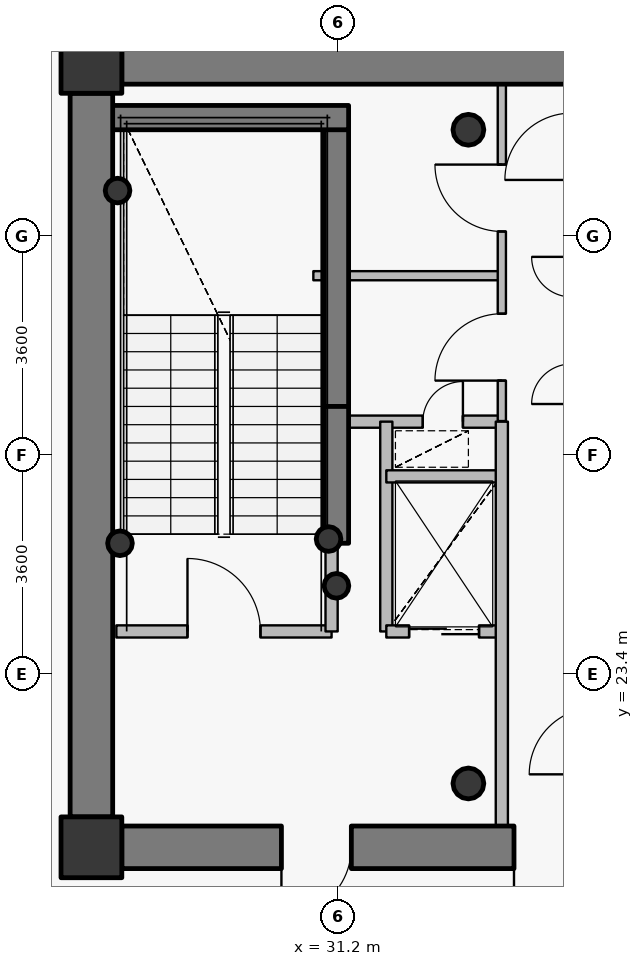
"""IFC4 building model, lengths in metres.
Left out: names, types, materials, properties, quantities, classifications, styles, units other than length and angle.
Written with IfcOpenShell. Run it as: python <this file> out.ifc"""

import sys

from ifc_helpers import new_model, si_unit, direction, frame, frame_2d, origin, origin_2d, place, context, subcontext, project, spatial, rectangle, hollow_circle, extrude, source, transform, mapped, element, fill, save


model = new_model("IFC4")
c1 = context("Model", 3, precision=1e-05, world=origin(), true_north=direction((0.0, 1.0)))
c2 = subcontext(c1, "Body", "Model", "MODEL_VIEW")
j1 = project(units=[si_unit("LENGTHUNIT", "METRE"), si_unit("PLANEANGLEUNIT", "RADIAN")], contexts=[c1])
p1 = place(None, origin())
s1 = spatial("IfcSite", under=j1, at=p1, CompositionType="ELEMENT")
p2 = place(p1, origin())
s2 = spatial("IfcBuilding", under=s1, at=p2, CompositionType="ELEMENT")
p3 = place(p2, frame((0.0, 0.0, 288.0)))
s3 = spatial("IfcBuildingStorey", under=s2, at=p3, CompositionType="ELEMENT", Elevation=288.0)
for number, where, z_axis, x_axis in (
    (1, (27.15, 20.55, 0.0), (0.0, 0.0, 1.0), (1.0, 0.0, 0.0)),
    (2, (27.15, 33.45, 0.0), (0.0, 0.0, 1.0), (1.0, 0.0, 0.0)),
):
    element("IfcColumn", number, at=place(p3, frame(where, z_axis=z_axis, x_axis=x_axis)), inside=s3, PredefinedType="COLUMN", context=c2, shape_type="SweptSolid", body=[
        extrude(rectangle(XDim=1.0, YDim=1.0, at=origin_2d()), origin(), (0.0, 0.0, 1.0), 3.75),
    ])
for number, where, z_axis, x_axis in (
    (3, (33.35, 21.6, 0.0), (0.0, 0.0, 1.0), (1.0, 0.0, 0.0)),
    (4, (33.35, 32.35, 0.0), (0.0, 0.0, 1.0), (1.0, 0.0, 0.0)),
):
    element("IfcColumn", number, at=place(p3, frame(where, z_axis=z_axis, x_axis=x_axis)), inside=s3, PredefinedType="COLUMN", context=c2, shape_type="SweptSolid", body=[
        extrude(hollow_circle(Radius=0.254, WallThickness=0.02, at=origin_2d()), origin(), (0.0, 0.0, 1.0), 3.75),
    ])
p4 = place(p3, frame((31.18, 27.8, 0.0), z_axis=(0.0, 0.0, 1.0), x_axis=(0.0, 1.0, 0.0)))
e5 = element("IfcWall", 5, at=p4, inside=s3, PredefinedType="SHEAR", context=c2, shape_type="SweptSolid", body=[
    extrude(rectangle(XDim=4.75, YDim=0.4, at=frame_2d((2.375, 0.0))), origin(), (0.0, 0.0, 1.0), 3.75),
])
p5 = place(p3, frame((27.25, 32.55, 0.0), z_axis=(0.0, 0.0, 1.0), x_axis=(1.0, 0.0, 0.0)))
e6 = element("IfcWall", 6, at=p5, inside=s3, PredefinedType="SHEAR", context=c2, shape_type="SweptSolid", body=[
    extrude(rectangle(XDim=4.13, YDim=0.4, at=frame_2d((2.065, 0.0))), origin(), (0.0, 0.0, 1.0), 3.75),
])
for number, where, z_axis, x_axis in (
    (7, (27.58, 31.35, 0.0), (0.0, 0.0, 1.0), (1.0, 0.0, 0.0)),
    (8, (31.05, 25.62, 0.0), (0.0, 0.0, 1.0), (1.0, 0.0, 0.0)),
    (9, (31.18, 24.85, 0.0), (0.0, 0.0, 1.0), (1.0, 0.0, 0.0)),
    (10, (27.62, 25.55, 0.0), (0.0, 0.0, 1.0), (1.0, 0.0, 0.0)),
):
    element("IfcColumn", number, at=place(p3, frame(where, z_axis=z_axis, x_axis=x_axis)), inside=s3, PredefinedType="COLUMN", context=c2, shape_type="SweptSolid", body=[
        extrude(hollow_circle(Radius=0.203, WallThickness=0.016, at=origin_2d()), origin(), (0.0, 0.0, 1.0), 3.75),
    ])
p6 = place(p3, frame((27.65, 33.45, 0.0), z_axis=(0.0, 0.0, 1.0), x_axis=(1.0, 0.0, 0.0)))
e11 = element("IfcWall", 11, at=p6, inside=s3, PredefinedType="SHEAR", context=c2, shape_type="SweptSolid", body=[
    extrude(rectangle(XDim=16.7, YDim=0.7, at=frame_2d((8.35, 0.0))), origin(), (0.0, 0.0, 1.0), 3.05),
])
p7 = place(p6, frame((12.775, 0.0, 0.0)))
e12 = element("IfcOpeningElement", 12, at=p7, cuts=e11, PredefinedType="OPENING", context=c2, shape_type="SweptSolid", body=[
    extrude(rectangle(XDim=1.15, YDim=2.15, at=origin_2d()), frame((0.575, 0.36, 1.075), z_axis=(0.0, -1.0, 0.0), x_axis=(1.0, 0.0, 0.0)), (0.0, 0.0, 1.0), 0.72),
])
p8 = place(p3, frame((44.35, 20.55, 0.0), z_axis=(0.0, 0.0, 1.0), x_axis=(-1.0, 0.0, 0.0)))
e13 = element("IfcWall", 13, at=p8, inside=s3, PredefinedType="SHEAR", context=c2, shape_type="SweptSolid", body=[
    extrude(rectangle(XDim=16.7, YDim=0.7, at=frame_2d((8.35, 0.0))), origin(), (0.0, 0.0, 1.0), 3.05),
])
p9 = place(p8, frame((12.925, 0.0, 0.0)))
e14 = element("IfcOpeningElement", 14, at=p9, cuts=e13, PredefinedType="OPENING", context=c2, shape_type="SweptSolid", body=[
    extrude(rectangle(XDim=1.15, YDim=2.15, at=origin_2d()), frame((0.575, 0.36, 1.075), z_axis=(0.0, -1.0, 0.0), x_axis=(1.0, 0.0, 0.0)), (0.0, 0.0, 1.0), 0.72),
])
p10 = place(p8, frame((9.1, 0.0, 0.0)))
e15 = element("IfcOpeningElement", 15, at=p10, cuts=e13, PredefinedType="OPENING", context=c2, shape_type="SweptSolid", body=[
    extrude(rectangle(XDim=1.15, YDim=2.15, at=origin_2d()), frame((0.575, 0.36, 1.075), z_axis=(0.0, -1.0, 0.0), x_axis=(1.0, 0.0, 0.0)), (0.0, 0.0, 1.0), 0.72),
])
p11 = place(p3, frame((27.15, 21.05, 0.0), z_axis=(0.0, 0.0, 1.0), x_axis=(0.0, 1.0, 0.0)))
e16 = element("IfcWall", 16, at=p11, inside=s3, PredefinedType="SHEAR", context=c2, shape_type="SweptSolid", body=[
    extrude(rectangle(XDim=11.9, YDim=0.7, at=frame_2d((5.95, 0.0))), origin(), (0.0, 0.0, 1.0), 3.05),
])
p12 = place(p3, frame((31.18, 25.55, 0.0), z_axis=(0.0, 0.0, 1.0), x_axis=(0.0, 1.0, 0.0)))
e17 = element("IfcWall", 17, at=p12, inside=s3, PredefinedType="SHEAR", context=c2, shape_type="SweptSolid", body=[
    extrude(rectangle(XDim=2.25, YDim=0.4, at=frame_2d((1.125, 0.0))), origin(), (0.0, 0.0, 1.0), 3.1),
])
p13 = place(p3, frame((27.56, 24.1, 0.0), z_axis=(0.0, 0.0, 1.0), x_axis=(1.0, 0.0, 0.0)))
e18 = element("IfcWall", 18, at=p13, inside=s3, PredefinedType="PARTITIONING", context=c2, shape_type="SweptSolid", body=[
    extrude(rectangle(XDim=3.54, YDim=0.2, at=frame_2d((1.77, 0.0))), origin(), (0.0, 0.0, 1.0), 3.5),
])
p14 = place(p13, frame((1.17, 0.0, 0.0)))
e19 = element("IfcOpeningElement", 19, at=p14, cuts=e18, PredefinedType="OPENING", context=c2, shape_type="SweptSolid", body=[
    extrude(rectangle(XDim=1.2, YDim=2.15, at=origin_2d()), frame((0.6, 0.11, 1.075), z_axis=(0.0, -1.0, 0.0), x_axis=(1.0, 0.0, 0.0)), (0.0, 0.0, 1.0), 0.22),
])
p15 = place(p3, frame((30.8, 29.95, 0.0), z_axis=(0.0, 0.0, 1.0), x_axis=(1.0, 0.0, 0.0)))
e20 = element("IfcWall", 20, at=p15, inside=s3, PredefinedType="PARTITIONING", context=c2, shape_type="SweptSolid", body=[
    extrude(rectangle(XDim=3.1, YDim=0.15, at=frame_2d((1.55, 0.0))), origin(), (0.0, 0.0, 1.0), 3.085),
])
p16 = place(p3, frame((31.1, 24.1, 0.0), z_axis=(0.0, 0.0, 1.0), x_axis=(0.0, 1.0, 0.0)))
e21 = element("IfcWall", 21, at=p16, inside=s3, PredefinedType="PARTITIONING", context=c2, shape_type="SweptSolid", body=[
    extrude(rectangle(XDim=1.44, YDim=0.2, at=frame_2d((0.72, 0.0))), origin(), (0.0, 0.0, 1.0), 3.5),
])
p17 = place(p3, frame((31.1, 27.55, 0.0), z_axis=(0.0, 0.0, 1.0), x_axis=(1.0, 0.0, 0.0)))
e22 = element("IfcWall", 22, at=p17, inside=s3, PredefinedType="PARTITIONING", context=c2, shape_type="SweptSolid", body=[
    extrude(rectangle(XDim=2.8, YDim=0.2, at=frame_2d((1.4, 0.0))), origin(), (0.0, 0.0, 1.0), 3.085),
])
p18 = place(p17, frame((1.5, 0.0, 0.0)))
e23 = element("IfcOpeningElement", 23, at=p18, cuts=e22, PredefinedType="OPENING", context=c2, shape_type="SweptSolid", body=[
    extrude(rectangle(XDim=0.66, YDim=2.05, at=origin_2d()), frame((0.33, 0.11, 1.025), z_axis=(0.0, -1.0, 0.0), x_axis=(1.0, 0.0, 0.0)), (0.0, 0.0, 1.0), 0.22),
])
p19 = place(p3, frame((32.0, 24.1, 0.0), z_axis=(0.0, 0.0, 1.0), x_axis=(0.0, 1.0, 0.0)))
e24 = element("IfcWall", 24, at=p19, inside=s3, PredefinedType="PARTITIONING", context=c2, shape_type="SweptSolid", body=[
    extrude(rectangle(XDim=3.45, YDim=0.2, at=frame_2d((1.725, 0.0))), origin(), (0.0, 0.0, 1.0), 3.5),
])
p20 = place(p3, frame((32.0, 24.1, 0.0), z_axis=(0.0, 0.0, 1.0), x_axis=(1.0, 0.0, 0.0)))
e25 = element("IfcWall", 25, at=p20, inside=s3, PredefinedType="PARTITIONING", context=c2, shape_type="SweptSolid", body=[
    extrude(rectangle(XDim=1.9, YDim=0.2, at=frame_2d((0.95, 0.0))), origin(), (0.0, 0.0, 1.0), 3.085),
])
p21 = place(p20, frame((0.375, 0.0, 0.0)))
e26 = element("IfcOpeningElement", 26, at=p21, cuts=e25, PredefinedType="OPENING", context=c2, shape_type="SweptSolid", body=[
    extrude(rectangle(XDim=1.15, YDim=2.15, at=origin_2d()), frame((0.575, 0.11, 1.075), z_axis=(0.0, -1.0, 0.0), x_axis=(1.0, 0.0, 0.0)), (0.0, 0.0, 1.0), 0.22),
])
p22 = place(p3, frame((32.0, 26.65, 0.0), z_axis=(0.0, 0.0, 1.0), x_axis=(1.0, 0.0, 0.0)))
e27 = element("IfcWall", 27, at=p22, inside=s3, PredefinedType="PARTITIONING", context=c2, shape_type="SweptSolid", body=[
    extrude(rectangle(XDim=1.9, YDim=0.2, at=frame_2d((0.95, 0.0))), origin(), (0.0, 0.0, 1.0), 3.085),
])
p23 = place(p3, frame((33.9, 20.9, 0.0), z_axis=(0.0, 0.0, 1.0), x_axis=(0.0, 1.0, 0.0)))
e28 = element("IfcWall", 28, at=p23, inside=s3, PredefinedType="PARTITIONING", context=c2, shape_type="SweptSolid", body=[
    extrude(rectangle(XDim=6.65, YDim=0.2, at=frame_2d((3.325, 0.0))), origin(), (0.0, 0.0, 1.0), 3.085),
])
p24 = place(p3, frame((33.9, 27.56, 0.0), z_axis=(0.0, 0.0, 1.0), x_axis=(0.0, 1.0, 0.0)))
e29 = element("IfcWall", 29, at=p24, inside=s3, PredefinedType="PARTITIONING", context=c2, shape_type="SweptSolid", body=[
    extrude(rectangle(XDim=5.54, YDim=0.135, at=frame_2d((2.77, 0.0))), origin(), (0.0, 0.0, 1.0), 3.085),
])
p25 = place(p24, frame((0.665, 0.0, 0.0)))
e30 = element("IfcOpeningElement", 30, at=p25, cuts=e29, PredefinedType="OPENING", context=c2, shape_type="SweptSolid", body=[
    extrude(rectangle(XDim=1.1, YDim=2.15, at=origin_2d()), frame((0.55, 0.078, 1.075), z_axis=(0.0, -1.0, 0.0), x_axis=(1.0, 0.0, 0.0)), (0.0, 0.0, 1.0), 0.155),
])
p26 = place(p24, frame((3.117, 0.0, 0.0)))
e31 = element("IfcOpeningElement", 31, at=p26, cuts=e29, PredefinedType="OPENING", context=c2, shape_type="SweptSolid", body=[
    extrude(rectangle(XDim=1.1, YDim=2.15, at=origin_2d()), frame((0.55, 0.078, 1.075), z_axis=(0.0, -1.0, 0.0), x_axis=(1.0, 0.0, 0.0)), (0.0, 0.0, 1.0), 0.155),
])
p27 = place(p3, frame((26.8, 33.492, 0.0), z_axis=(0.0, 0.0, 1.0), x_axis=(0.0, -1.0, 0.0)))
e32 = element("IfcWall", 32, at=p27, inside=s3, PredefinedType="PARTITIONING", context=c2, shape_type="SweptSolid", body=[
    extrude(rectangle(XDim=0.532, YDim=0.135, at=frame_2d((0.266, 0.0))), origin(), (0.0, 0.0, 1.0), 3.5),
])
p28 = place(p3, frame((26.8, 21.04, 0.0), z_axis=(0.0, 0.0, 1.0), x_axis=(0.0, -1.0, 0.0)))
e33 = element("IfcWall", 33, at=p28, inside=s3, PredefinedType="PARTITIONING", context=c2, shape_type="SweptSolid", body=[
    extrude(rectangle(XDim=0.84, YDim=0.135, at=frame_2d((0.42, 0.0))), origin(), (0.0, 0.0, 1.0), 3.035),
])
p29 = place(p3, frame((27.107, 20.2, 0.0), z_axis=(0.0, 0.0, 1.0), x_axis=(1.0, 0.0, 0.0)))
e34 = element("IfcWall", 34, at=p29, inside=s3, PredefinedType="PARTITIONING", context=c2, shape_type="SweptSolid", body=[
    extrude(rectangle(XDim=0.532, YDim=0.135, at=frame_2d((0.266, 0.0))), origin(), (0.0, 0.0, 1.0), 3.035),
])
m1 = source(origin(), c2, "Body", "SweptSolid", [
    extrude(rectangle(XDim=1.15, YDim=2.15, at=origin_2d()), frame((0.575, 0.025, 1.075), z_axis=(0.0, -1.0, 0.0), x_axis=(1.0, 0.0, 0.0)), (0.0, 0.0, 1.0), 0.05),
])
p30 = place(p9, origin())
e35 = element("IfcDoor", 35, at=p30, inside=s3, OperationType="SINGLE_SWING_RIGHT", PredefinedType="DOOR", context=c2, shape_type="MappedRepresentation", body=[
    mapped(m1, transform((0.0, 0.0, 0.0), x_axis=(1.0, 0.0, 0.0), y_axis=(0.0, 1.0, 0.0), z_axis=(0.0, 0.0, 1.0), scale=1.0)),
])
fill(e14, e35)
p31 = place(p10, origin())
e36 = element("IfcDoor", 36, at=p31, inside=s3, OperationType="SINGLE_SWING_RIGHT", PredefinedType="DOOR", context=c2, shape_type="MappedRepresentation", body=[
    mapped(m1, transform((0.0, 0.0, 0.0), x_axis=(1.0, 0.0, 0.0), y_axis=(0.0, 1.0, 0.0), z_axis=(0.0, 0.0, 1.0), scale=1.0)),
])
fill(e15, e36)
m2 = source(origin(), c2, "Body", "SweptSolid", [
    extrude(rectangle(XDim=1.2, YDim=2.15, at=origin_2d()), frame((0.6, 0.025, 1.075), z_axis=(0.0, -1.0, 0.0), x_axis=(1.0, 0.0, 0.0)), (0.0, 0.0, 1.0), 0.05),
])
p32 = place(p14, origin())
e37 = element("IfcDoor", 37, at=p32, inside=s3, OperationType="SINGLE_SWING_LEFT", PredefinedType="DOOR", context=c2, shape_type="MappedRepresentation", body=[
    mapped(m2, transform((0.0, 0.0, 0.0), x_axis=(1.0, 0.0, 0.0), y_axis=(0.0, 1.0, 0.0), z_axis=(0.0, 0.0, 1.0), scale=1.0)),
])
fill(e19, e37)
m3 = source(origin(), c2, "Body", "SweptSolid", [
    extrude(rectangle(XDim=1.15, YDim=2.15, at=origin_2d()), frame((0.575, 0.025, 1.075), z_axis=(0.0, -1.0, 0.0), x_axis=(1.0, 0.0, 0.0)), (0.0, 0.0, 1.0), 0.05),
])
p33 = place(p21, origin())
e38 = element("IfcDoor", 38, at=p33, inside=s3, OperationType="DOUBLE_DOOR_SLIDING", PredefinedType="USERDEFINED", context=c2, shape_type="MappedRepresentation", body=[
    mapped(m3, transform((0.0, 0.0, 0.0), x_axis=(1.0, 0.0, 0.0), y_axis=(0.0, 1.0, 0.0), z_axis=(0.0, 0.0, 1.0), scale=1.0)),
])
fill(e26, e38)
m4 = source(origin(), c2, "Body", "SweptSolid", [
    extrude(rectangle(XDim=1.1, YDim=2.15, at=origin_2d()), frame((0.55, 0.025, 1.075), z_axis=(0.0, -1.0, 0.0), x_axis=(1.0, 0.0, 0.0)), (0.0, 0.0, 1.0), 0.05),
])
p34 = place(p25, origin())
e39 = element("IfcDoor", 39, at=p34, inside=s3, OperationType="SINGLE_SWING_LEFT", PredefinedType="DOOR", context=c2, shape_type="MappedRepresentation", body=[
    mapped(m4, transform((0.0, 0.0, 0.0), x_axis=(1.0, 0.0, 0.0), y_axis=(0.0, 1.0, 0.0), z_axis=(0.0, 0.0, 1.0), scale=1.0)),
])
fill(e30, e39)
p35 = place(p26, origin())
e40 = element("IfcDoor", 40, at=p35, inside=s3, OperationType="SINGLE_SWING_RIGHT", PredefinedType="DOOR", context=c2, shape_type="MappedRepresentation", body=[
    mapped(m4, transform((0.0, 0.0, 0.0), x_axis=(1.0, 0.0, 0.0), y_axis=(0.0, 1.0, 0.0), z_axis=(0.0, 0.0, 1.0), scale=1.0)),
])
fill(e31, e40)
m5 = source(origin(), c2, "Body", "SweptSolid", [
    extrude(rectangle(XDim=0.66, YDim=2.05, at=origin_2d()), frame((0.33, 0.025, 1.025), z_axis=(0.0, -1.0, 0.0), x_axis=(1.0, 0.0, 0.0)), (0.0, 0.0, 1.0), 0.05),
])
p36 = place(p18, origin())
e41 = element("IfcDoor", 41, at=p36, inside=s3, OperationType="SINGLE_SWING_RIGHT", PredefinedType="USERDEFINED", context=c2, shape_type="MappedRepresentation", body=[
    mapped(m5, transform((0.0, 0.0, 0.0), x_axis=(1.0, 0.0, 0.0), y_axis=(0.0, 1.0, 0.0), z_axis=(0.0, 0.0, 1.0), scale=1.0)),
])
fill(e23, e41)
save(model, sys.argv[1])
